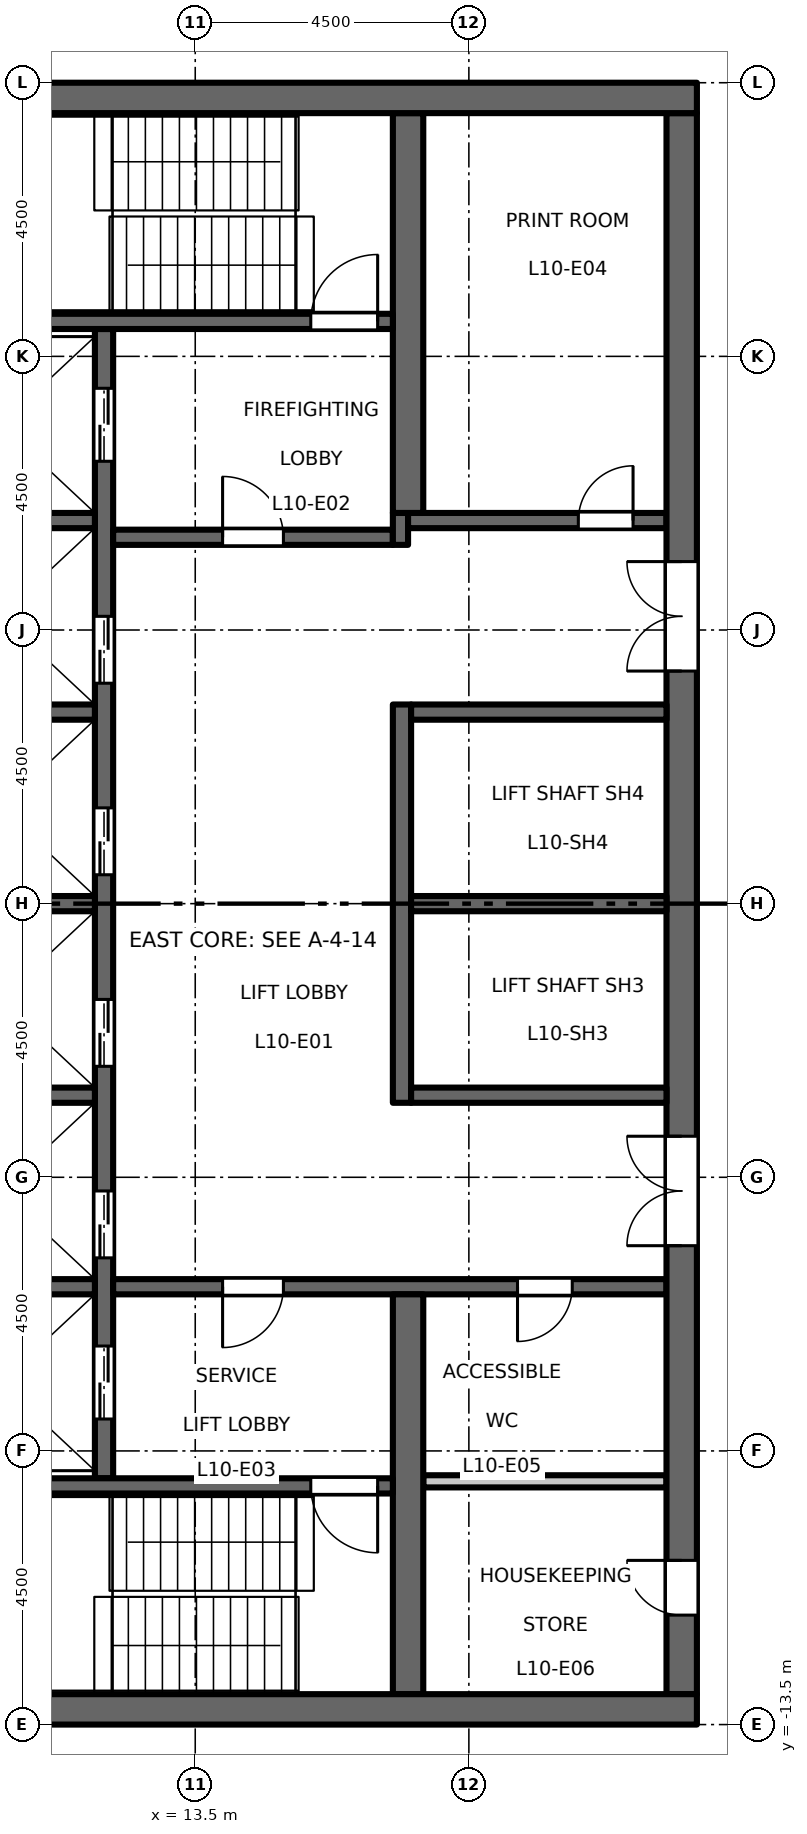
"""IFC4 building model, lengths in metres.
Left out: names, types, materials, properties, quantities, classifications, styles, units other than length and angle.
Written with IfcOpenShell. Run it as: python <this file> out.ifc"""

import sys

from ifc_helpers import new_model, si_unit, direction, frame, frame_2d, origin, place, context, subcontext, project, spatial, rectangle, extrude, element, fill, save


model = new_model("IFC4")
c1 = context("Model", 3, precision=1e-05, world=origin(), true_north=direction((0.0, 1.0)))
c2 = subcontext(c1, "Body", "Model", "MODEL_VIEW")
j1 = project(units=[si_unit("LENGTHUNIT", "METRE"), si_unit("PLANEANGLEUNIT", "RADIAN")], contexts=[c1])
p1 = place(None, origin())
s1 = spatial("IfcSite", under=j1, at=p1, CompositionType="ELEMENT")
p2 = place(p1, origin())
s2 = spatial("IfcBuilding", under=s1, at=p2, CompositionType="ELEMENT")
p3 = place(p2, frame((0.0, 0.0, 49.2)))
s3 = spatial("IfcBuildingStorey", under=s2, at=p3, CompositionType="ELEMENT", Elevation=49.2)
p4 = place(p3, frame((12.0, -9.45, 0.0), z_axis=(0.0, 0.0, 1.0), x_axis=(0.0, 1.0, 0.0)))
e1 = element("IfcWall", 1, at=p4, inside=s3, PredefinedType="SHEAR", context=c2, shape_type="SweptSolid", body=[
    extrude(rectangle(XDim=18.9, YDim=0.3, at=frame_2d((9.45, 0.0))), origin(), (0.0, 0.0, 1.0), 4.35),
])
p5 = place(p4, frame((3.625, 0.0, 0.0)))
e2 = element("IfcOpeningElement", 2, at=p5, cuts=e1, PredefinedType="OPENING", context=c2, shape_type="SweptSolid", body=[
    extrude(rectangle(XDim=1.1, YDim=2.1, at=frame_2d((0.55, 1.05))), frame((0.0, 0.16, 0.0), z_axis=(0.0, -1.0, 0.0), x_axis=(1.0, 0.0, 0.0)), (0.0, 0.0, 1.0), 0.32),
])
p6 = place(p4, frame((6.775, 0.0, 0.0)))
e3 = element("IfcOpeningElement", 3, at=p6, cuts=e1, PredefinedType="OPENING", context=c2, shape_type="SweptSolid", body=[
    extrude(rectangle(XDim=1.1, YDim=2.1, at=frame_2d((0.55, 1.05))), frame((0.0, 0.16, 0.0), z_axis=(0.0, -1.0, 0.0), x_axis=(1.0, 0.0, 0.0)), (0.0, 0.0, 1.0), 0.32),
])
p7 = place(p4, frame((9.925, 0.0, 0.0)))
e4 = element("IfcOpeningElement", 4, at=p7, cuts=e1, PredefinedType="OPENING", context=c2, shape_type="SweptSolid", body=[
    extrude(rectangle(XDim=1.1, YDim=2.1, at=frame_2d((0.55, 1.05))), frame((0.0, 0.16, 0.0), z_axis=(0.0, -1.0, 0.0), x_axis=(1.0, 0.0, 0.0)), (0.0, 0.0, 1.0), 0.32),
])
p8 = place(p4, frame((13.075, 0.0, 0.0)))
e5 = element("IfcOpeningElement", 5, at=p8, cuts=e1, PredefinedType="OPENING", context=c2, shape_type="SweptSolid", body=[
    extrude(rectangle(XDim=1.1, YDim=2.1, at=frame_2d((0.55, 1.05))), frame((0.0, 0.16, 0.0), z_axis=(0.0, -1.0, 0.0), x_axis=(1.0, 0.0, 0.0)), (0.0, 0.0, 1.0), 0.32),
])
p9 = place(p4, frame((16.725, 0.0, 0.0)))
e6 = element("IfcOpeningElement", 6, at=p9, cuts=e1, PredefinedType="OPENING", context=c2, shape_type="SweptSolid", body=[
    extrude(rectangle(XDim=1.2, YDim=2.1, at=frame_2d((0.6, 1.05))), frame((0.0, 0.16, 0.0), z_axis=(0.0, -1.0, 0.0), x_axis=(1.0, 0.0, 0.0)), (0.0, 0.0, 1.0), 0.32),
])
p10 = place(p4, frame((0.975, 0.0, 0.0)))
e7 = element("IfcOpeningElement", 7, at=p10, cuts=e1, PredefinedType="OPENING", context=c2, shape_type="SweptSolid", body=[
    extrude(rectangle(XDim=1.2, YDim=2.1, at=frame_2d((0.6, 1.05))), frame((0.0, 0.16, 0.0), z_axis=(0.0, -1.0, 0.0), x_axis=(1.0, 0.0, 0.0)), (0.0, 0.0, 1.0), 0.32),
])
p11 = place(p3, frame((12.15, 6.025, 0.0), z_axis=(0.0, 0.0, 1.0), x_axis=(1.0, 0.0, 0.0)))
e8 = element("IfcWall", 8, at=p11, inside=s3, PredefinedType="SHEAR", context=c2, shape_type="SweptSolid", body=[
    extrude(rectangle(XDim=4.6, YDim=0.25, at=frame_2d((2.3, 0.0))), origin(), (0.0, 0.0, 1.0), 4.35),
])
p12 = place(p11, frame((1.8, 0.0, 0.0)))
e9 = element("IfcOpeningElement", 9, at=p12, cuts=e8, PredefinedType="OPENING", context=c2, shape_type="SweptSolid", body=[
    extrude(rectangle(XDim=1.0, YDim=2.1, at=frame_2d((0.5, 1.05))), frame((0.0, 0.135, 0.0), z_axis=(0.0, -1.0, 0.0), x_axis=(1.0, 0.0, 0.0)), (0.0, 0.0, 1.0), 0.27),
])
p13 = place(p3, frame((16.875, 5.9, 0.0), z_axis=(0.0, 0.0, 1.0), x_axis=(0.0, 1.0, 0.0)))
e10 = element("IfcWall", 10, at=p13, inside=s3, PredefinedType="SHEAR", context=c2, shape_type="SweptSolid", body=[
    extrude(rectangle(XDim=0.525, YDim=0.25, at=frame_2d((0.263, 0.0))), origin(), (0.0, 0.0, 1.0), 4.35),
])
p14 = place(p3, frame((17.0, 6.3, 0.0), z_axis=(0.0, 0.0, 1.0), x_axis=(1.0, 0.0, 0.0)))
e11 = element("IfcWall", 11, at=p14, inside=s3, PredefinedType="SHEAR", context=c2, shape_type="SweptSolid", body=[
    extrude(rectangle(XDim=4.25, YDim=0.25, at=frame_2d((2.125, 0.0))), origin(), (0.0, 0.0, 1.0), 4.35),
])
p15 = place(p14, frame((2.8, 0.0, 0.0)))
e12 = element("IfcOpeningElement", 12, at=p15, cuts=e11, PredefinedType="OPENING", context=c2, shape_type="SweptSolid", body=[
    extrude(rectangle(XDim=0.9, YDim=2.1, at=frame_2d((0.45, 1.05))), frame((0.0, 0.135, 0.0), z_axis=(0.0, -1.0, 0.0), x_axis=(1.0, 0.0, 0.0)), (0.0, 0.0, 1.0), 0.27),
])
p16 = place(p3, frame((12.15, -6.3, 0.0), z_axis=(0.0, 0.0, 1.0), x_axis=(1.0, 0.0, 0.0)))
e13 = element("IfcWall", 13, at=p16, inside=s3, PredefinedType="SHEAR", context=c2, shape_type="SweptSolid", body=[
    extrude(rectangle(XDim=9.1, YDim=0.25, at=frame_2d((4.55, 0.0))), origin(), (0.0, 0.0, 1.0), 4.35),
])
p17 = place(p16, frame((1.8, 0.0, 0.0)))
e14 = element("IfcOpeningElement", 14, at=p17, cuts=e13, PredefinedType="OPENING", context=c2, shape_type="SweptSolid", body=[
    extrude(rectangle(XDim=1.0, YDim=2.1, at=frame_2d((0.5, 1.05))), frame((0.0, 0.135, 0.0), z_axis=(0.0, -1.0, 0.0), x_axis=(1.0, 0.0, 0.0)), (0.0, 0.0, 1.0), 0.27),
])
p18 = place(p16, frame((6.65, 0.0, 0.0)))
e15 = element("IfcOpeningElement", 15, at=p18, cuts=e13, PredefinedType="OPENING", context=c2, shape_type="SweptSolid", body=[
    extrude(rectangle(XDim=0.9, YDim=2.1, at=frame_2d((0.45, 1.05))), frame((0.0, 0.135, 0.0), z_axis=(0.0, -1.0, 0.0), x_axis=(1.0, 0.0, 0.0)), (0.0, 0.0, 1.0), 0.27),
])
p19 = place(p3, frame((21.5, -13.0, 0.0), z_axis=(0.0, 0.0, 1.0), x_axis=(0.0, 1.0, 0.0)))
e16 = element("IfcWall", 16, at=p19, inside=s3, PredefinedType="SHEAR", context=c2, shape_type="SweptSolid", body=[
    extrude(rectangle(XDim=26.0, YDim=0.5, at=frame_2d((13.0, 0.0))), origin(), (0.0, 0.0, 1.0), 4.35),
])
p20 = place(p19, frame((16.825, 0.0, 0.0)))
e17 = element("IfcOpeningElement", 17, at=p20, cuts=e16, PredefinedType="OPENING", context=c2, shape_type="SweptSolid", body=[
    extrude(rectangle(XDim=1.8, YDim=2.1, at=frame_2d((0.9, 1.05))), frame((0.0, 0.26, 0.0), z_axis=(0.0, -1.0, 0.0), x_axis=(1.0, 0.0, 0.0)), (0.0, 0.0, 1.0), 0.52),
])
p21 = place(p19, frame((7.375, 0.0, 0.0)))
e18 = element("IfcOpeningElement", 18, at=p21, cuts=e16, PredefinedType="OPENING", context=c2, shape_type="SweptSolid", body=[
    extrude(rectangle(XDim=1.8, YDim=2.1, at=frame_2d((0.9, 1.05))), frame((0.0, 0.26, 0.0), z_axis=(0.0, -1.0, 0.0), x_axis=(1.0, 0.0, 0.0)), (0.0, 0.0, 1.0), 0.52),
])
p22 = place(p19, frame((1.3, 0.0, 0.0)))
e19 = element("IfcOpeningElement", 19, at=p22, cuts=e16, PredefinedType="OPENING", context=c2, shape_type="SweptSolid", body=[
    extrude(rectangle(XDim=0.9, YDim=2.1, at=frame_2d((0.45, 1.05))), frame((0.0, 0.26, 0.0), z_axis=(0.0, -1.0, 0.0), x_axis=(1.0, 0.0, 0.0)), (0.0, 0.0, 1.0), 0.52),
])
p23 = place(p3, frame((17.25, -9.5, 0.0), z_axis=(0.0, 0.0, 1.0), x_axis=(1.0, 0.0, 0.0)))
e20 = element("IfcWall", 20, at=p23, inside=s3, PredefinedType="PARTITIONING", context=c2, shape_type="SweptSolid", body=[
    extrude(rectangle(XDim=4.0, YDim=0.2, at=frame_2d((2.0, 0.0))), origin(), (0.0, 0.0, 1.0), 4.35),
])
p24 = place(p3, frame((16.9, -3.275, 0.0), z_axis=(0.0, 0.0, 1.0), x_axis=(0.0, 1.0, 0.0)))
e21 = element("IfcWall", 21, at=p24, inside=s3, PredefinedType="SHEAR", context=c2, shape_type="SweptSolid", body=[
    extrude(rectangle(XDim=6.55, YDim=0.3, at=frame_2d((3.275, 0.0))), origin(), (0.0, 0.0, 1.0), 4.35),
])
for number, where, z_axis, x_axis in (
    (22, (17.05, 0.0, 0.0), (0.0, 0.0, 1.0), (1.0, 0.0, 0.0)),
    (23, (17.05, 3.15, 0.0), (0.0, 0.0, 1.0), (1.0, 0.0, 0.0)),
    (24, (17.05, -3.15, 0.0), (0.0, 0.0, 1.0), (1.0, 0.0, 0.0)),
):
    element("IfcWall", number, at=place(p3, frame(where, z_axis=z_axis, x_axis=x_axis)), inside=s3, PredefinedType="SHEAR", context=c2, shape_type="SweptSolid", body=[
        extrude(rectangle(XDim=4.2, YDim=0.25, at=frame_2d((2.1, 0.0))), origin(), (0.0, 0.0, 1.0), 4.35),
    ])
for number, where, z_axis, x_axis in (
    (25, (17.0, 6.425, 0.0), (0.0, 0.0, 1.0), (0.0, 1.0, 0.0)),
    (26, (17.0, -13.0, 0.0), (0.0, 0.0, 1.0), (0.0, 1.0, 0.0)),
):
    element("IfcWall", number, at=place(p3, frame(where, z_axis=z_axis, x_axis=x_axis)), inside=s3, PredefinedType="SHEAR", context=c2, shape_type="SweptSolid", body=[
        extrude(rectangle(XDim=6.575, YDim=0.5, at=frame_2d((3.288, 0.0))), origin(), (0.0, 0.0, 1.0), 4.35),
    ])
for number, where, z_axis, x_axis in (
    (27, (8.75, 0.0, 0.0), (0.0, 0.0, 1.0), (1.0, 0.0, 0.0)),
    (28, (8.75, 3.15, 0.0), (0.0, 0.0, 1.0), (1.0, 0.0, 0.0)),
    (29, (8.75, 6.3, 0.0), (0.0, 0.0, 1.0), (1.0, 0.0, 0.0)),
    (30, (8.75, -3.15, 0.0), (0.0, 0.0, 1.0), (1.0, 0.0, 0.0)),
    (31, (8.75, -6.3, 0.0), (0.0, 0.0, 1.0), (1.0, 0.0, 0.0)),
):
    element("IfcWall", number, at=place(p3, frame(where, z_axis=z_axis, x_axis=x_axis)), inside=s3, PredefinedType="SHEAR", context=c2, shape_type="SweptSolid", body=[
        extrude(rectangle(XDim=3.1, YDim=0.25, at=frame_2d((1.55, 0.0))), origin(), (0.0, 0.0, 1.0), 4.35),
    ])
p25 = place(p3, frame((8.75, 9.575, 0.0), z_axis=(0.0, 0.0, 1.0), x_axis=(1.0, 0.0, 0.0)))
e32 = element("IfcWall", 32, at=p25, inside=s3, PredefinedType="SHEAR", context=c2, shape_type="SweptSolid", body=[
    extrude(rectangle(XDim=8.0, YDim=0.25, at=frame_2d((4.0, 0.0))), origin(), (0.0, 0.0, 1.0), 4.35),
])
p26 = place(p25, frame((6.65, 0.0, 0.0)))
e33 = element("IfcOpeningElement", 33, at=p26, cuts=e32, PredefinedType="OPENING", context=c2, shape_type="SweptSolid", body=[
    extrude(rectangle(XDim=1.1, YDim=2.1, at=frame_2d((0.55, 1.05))), frame((0.0, 0.135, 0.0), z_axis=(0.0, -1.0, 0.0), x_axis=(1.0, 0.0, 0.0)), (0.0, 0.0, 1.0), 0.27),
])
p27 = place(p3, frame((8.75, -9.575, 0.0), z_axis=(0.0, 0.0, 1.0), x_axis=(1.0, 0.0, 0.0)))
e34 = element("IfcWall", 34, at=p27, inside=s3, PredefinedType="SHEAR", context=c2, shape_type="SweptSolid", body=[
    extrude(rectangle(XDim=8.0, YDim=0.25, at=frame_2d((4.0, 0.0))), origin(), (0.0, 0.0, 1.0), 4.35),
])
p28 = place(p27, frame((6.65, 0.0, 0.0)))
e35 = element("IfcOpeningElement", 35, at=p28, cuts=e34, PredefinedType="OPENING", context=c2, shape_type="SweptSolid", body=[
    extrude(rectangle(XDim=1.1, YDim=2.1, at=frame_2d((0.55, 1.05))), frame((0.0, 0.135, 0.0), z_axis=(0.0, -1.0, 0.0), x_axis=(1.0, 0.0, 0.0)), (0.0, 0.0, 1.0), 0.27),
])
for number, where, z_axis, x_axis in (
    (36, (8.25, 13.25, 0.0), (0.0, 0.0, 1.0), (1.0, 0.0, 0.0)),
    (37, (8.25, -13.25, 0.0), (0.0, 0.0, 1.0), (1.0, 0.0, 0.0)),
):
    element("IfcWall", number, at=place(p3, frame(where, z_axis=z_axis, x_axis=x_axis)), inside=s3, PredefinedType="SHEAR", context=c2, shape_type="SweptSolid", body=[
        extrude(rectangle(XDim=13.5, YDim=0.5, at=frame_2d((6.75, 0.0))), origin(), (0.0, 0.0, 1.0), 4.35),
    ])
p29 = place(p12, origin())
e38 = element("IfcDoor", 38, at=p29, inside=s3, OperationType="SINGLE_SWING_RIGHT", PredefinedType="DOOR", context=c2, shape_type="SweptSolid", body=[
    extrude(rectangle(XDim=1.0, YDim=2.1, at=frame_2d((0.5, 1.05))), frame((0.0, 0.025, 0.0), z_axis=(0.0, -1.0, 0.0), x_axis=(1.0, 0.0, 0.0)), (0.0, 0.0, 1.0), 0.05),
])
fill(e9, e38)
p30 = place(p17, origin())
e39 = element("IfcDoor", 39, at=p30, inside=s3, OperationType="SINGLE_SWING_LEFT", PredefinedType="DOOR", context=c2, shape_type="SweptSolid", body=[
    extrude(rectangle(XDim=1.0, YDim=2.1, at=frame_2d((0.5, 1.05))), frame((0.0, 0.025, 0.0), z_axis=(0.0, -1.0, 0.0), x_axis=(1.0, 0.0, 0.0)), (0.0, 0.0, 1.0), 0.05),
])
fill(e14, e39)
p31 = place(p26, origin())
e40 = element("IfcDoor", 40, at=p31, inside=s3, OperationType="SINGLE_SWING_LEFT", PredefinedType="DOOR", context=c2, shape_type="SweptSolid", body=[
    extrude(rectangle(XDim=1.1, YDim=2.1, at=frame_2d((0.55, 1.05))), frame((0.0, 0.025, 0.0), z_axis=(0.0, -1.0, 0.0), x_axis=(1.0, 0.0, 0.0)), (0.0, 0.0, 1.0), 0.05),
])
fill(e33, e40)
p32 = place(p28, origin())
e41 = element("IfcDoor", 41, at=p32, inside=s3, OperationType="SINGLE_SWING_RIGHT", PredefinedType="DOOR", context=c2, shape_type="SweptSolid", body=[
    extrude(rectangle(XDim=1.1, YDim=2.1, at=frame_2d((0.55, 1.05))), frame((0.0, 0.025, 0.0), z_axis=(0.0, -1.0, 0.0), x_axis=(1.0, 0.0, 0.0)), (0.0, 0.0, 1.0), 0.05),
])
fill(e35, e41)
p33 = place(p20, origin())
e42 = element("IfcDoor", 42, at=p33, inside=s3, OperationType="DOUBLE_DOOR_DOUBLE_SWING", PredefinedType="DOOR", context=c2, shape_type="SweptSolid", body=[
    extrude(rectangle(XDim=1.8, YDim=2.1, at=frame_2d((0.9, 1.05))), frame((0.0, 0.025, 0.0), z_axis=(0.0, -1.0, 0.0), x_axis=(1.0, 0.0, 0.0)), (0.0, 0.0, 1.0), 0.05),
])
fill(e17, e42)
p34 = place(p21, origin())
e43 = element("IfcDoor", 43, at=p34, inside=s3, OperationType="DOUBLE_DOOR_DOUBLE_SWING", PredefinedType="DOOR", context=c2, shape_type="SweptSolid", body=[
    extrude(rectangle(XDim=1.8, YDim=2.1, at=frame_2d((0.9, 1.05))), frame((0.0, 0.025, 0.0), z_axis=(0.0, -1.0, 0.0), x_axis=(1.0, 0.0, 0.0)), (0.0, 0.0, 1.0), 0.05),
])
fill(e18, e43)
p35 = place(p5, origin())
e44 = element("IfcDoor", 44, at=p35, inside=s3, OperationType="DOUBLE_DOOR_SLIDING", PredefinedType="DOOR", context=c2, shape_type="SweptSolid", body=[
    extrude(rectangle(XDim=1.1, YDim=2.1, at=frame_2d((0.55, 1.05))), frame((0.0, 0.025, 0.0), z_axis=(0.0, -1.0, 0.0), x_axis=(1.0, 0.0, 0.0)), (0.0, 0.0, 1.0), 0.05),
])
fill(e2, e44)
p36 = place(p6, origin())
e45 = element("IfcDoor", 45, at=p36, inside=s3, OperationType="DOUBLE_DOOR_SLIDING", PredefinedType="DOOR", context=c2, shape_type="SweptSolid", body=[
    extrude(rectangle(XDim=1.1, YDim=2.1, at=frame_2d((0.55, 1.05))), frame((0.0, 0.025, 0.0), z_axis=(0.0, -1.0, 0.0), x_axis=(1.0, 0.0, 0.0)), (0.0, 0.0, 1.0), 0.05),
])
fill(e3, e45)
p37 = place(p7, origin())
e46 = element("IfcDoor", 46, at=p37, inside=s3, OperationType="DOUBLE_DOOR_SLIDING", PredefinedType="DOOR", context=c2, shape_type="SweptSolid", body=[
    extrude(rectangle(XDim=1.1, YDim=2.1, at=frame_2d((0.55, 1.05))), frame((0.0, 0.025, 0.0), z_axis=(0.0, -1.0, 0.0), x_axis=(1.0, 0.0, 0.0)), (0.0, 0.0, 1.0), 0.05),
])
fill(e4, e46)
p38 = place(p8, origin())
e47 = element("IfcDoor", 47, at=p38, inside=s3, OperationType="DOUBLE_DOOR_SLIDING", PredefinedType="DOOR", context=c2, shape_type="SweptSolid", body=[
    extrude(rectangle(XDim=1.1, YDim=2.1, at=frame_2d((0.55, 1.05))), frame((0.0, 0.025, 0.0), z_axis=(0.0, -1.0, 0.0), x_axis=(1.0, 0.0, 0.0)), (0.0, 0.0, 1.0), 0.05),
])
fill(e5, e47)
p39 = place(p9, origin())
e48 = element("IfcDoor", 48, at=p39, inside=s3, OperationType="DOUBLE_DOOR_SLIDING", PredefinedType="DOOR", context=c2, shape_type="SweptSolid", body=[
    extrude(rectangle(XDim=1.2, YDim=2.1, at=frame_2d((0.6, 1.05))), frame((0.0, 0.025, 0.0), z_axis=(0.0, -1.0, 0.0), x_axis=(1.0, 0.0, 0.0)), (0.0, 0.0, 1.0), 0.05),
])
fill(e6, e48)
p40 = place(p10, origin())
e49 = element("IfcDoor", 49, at=p40, inside=s3, OperationType="DOUBLE_DOOR_SLIDING", PredefinedType="DOOR", context=c2, shape_type="SweptSolid", body=[
    extrude(rectangle(XDim=1.2, YDim=2.1, at=frame_2d((0.6, 1.05))), frame((0.0, 0.025, 0.0), z_axis=(0.0, -1.0, 0.0), x_axis=(1.0, 0.0, 0.0)), (0.0, 0.0, 1.0), 0.05),
])
fill(e7, e49)
p41 = place(p15, origin())
e50 = element("IfcDoor", 50, at=p41, inside=s3, OperationType="SINGLE_SWING_LEFT", PredefinedType="DOOR", context=c2, shape_type="SweptSolid", body=[
    extrude(rectangle(XDim=0.9, YDim=2.1, at=frame_2d((0.45, 1.05))), frame((0.0, 0.025, 0.0), z_axis=(0.0, -1.0, 0.0), x_axis=(1.0, 0.0, 0.0)), (0.0, 0.0, 1.0), 0.05),
])
fill(e12, e50)
p42 = place(p18, origin())
e51 = element("IfcDoor", 51, at=p42, inside=s3, OperationType="SINGLE_SWING_LEFT", PredefinedType="DOOR", context=c2, shape_type="SweptSolid", body=[
    extrude(rectangle(XDim=0.9, YDim=2.1, at=frame_2d((0.45, 1.05))), frame((0.0, 0.025, 0.0), z_axis=(0.0, -1.0, 0.0), x_axis=(1.0, 0.0, 0.0)), (0.0, 0.0, 1.0), 0.05),
])
fill(e15, e51)
p43 = place(p22, origin())
e52 = element("IfcDoor", 52, at=p43, inside=s3, OperationType="SINGLE_SWING_LEFT", PredefinedType="DOOR", context=c2, shape_type="SweptSolid", body=[
    extrude(rectangle(XDim=0.9, YDim=2.1, at=frame_2d((0.45, 1.05))), frame((0.0, 0.025, 0.0), z_axis=(0.0, -1.0, 0.0), x_axis=(1.0, 0.0, 0.0)), (0.0, 0.0, 1.0), 0.05),
])
fill(e19, e52)
save(model, sys.argv[1])
